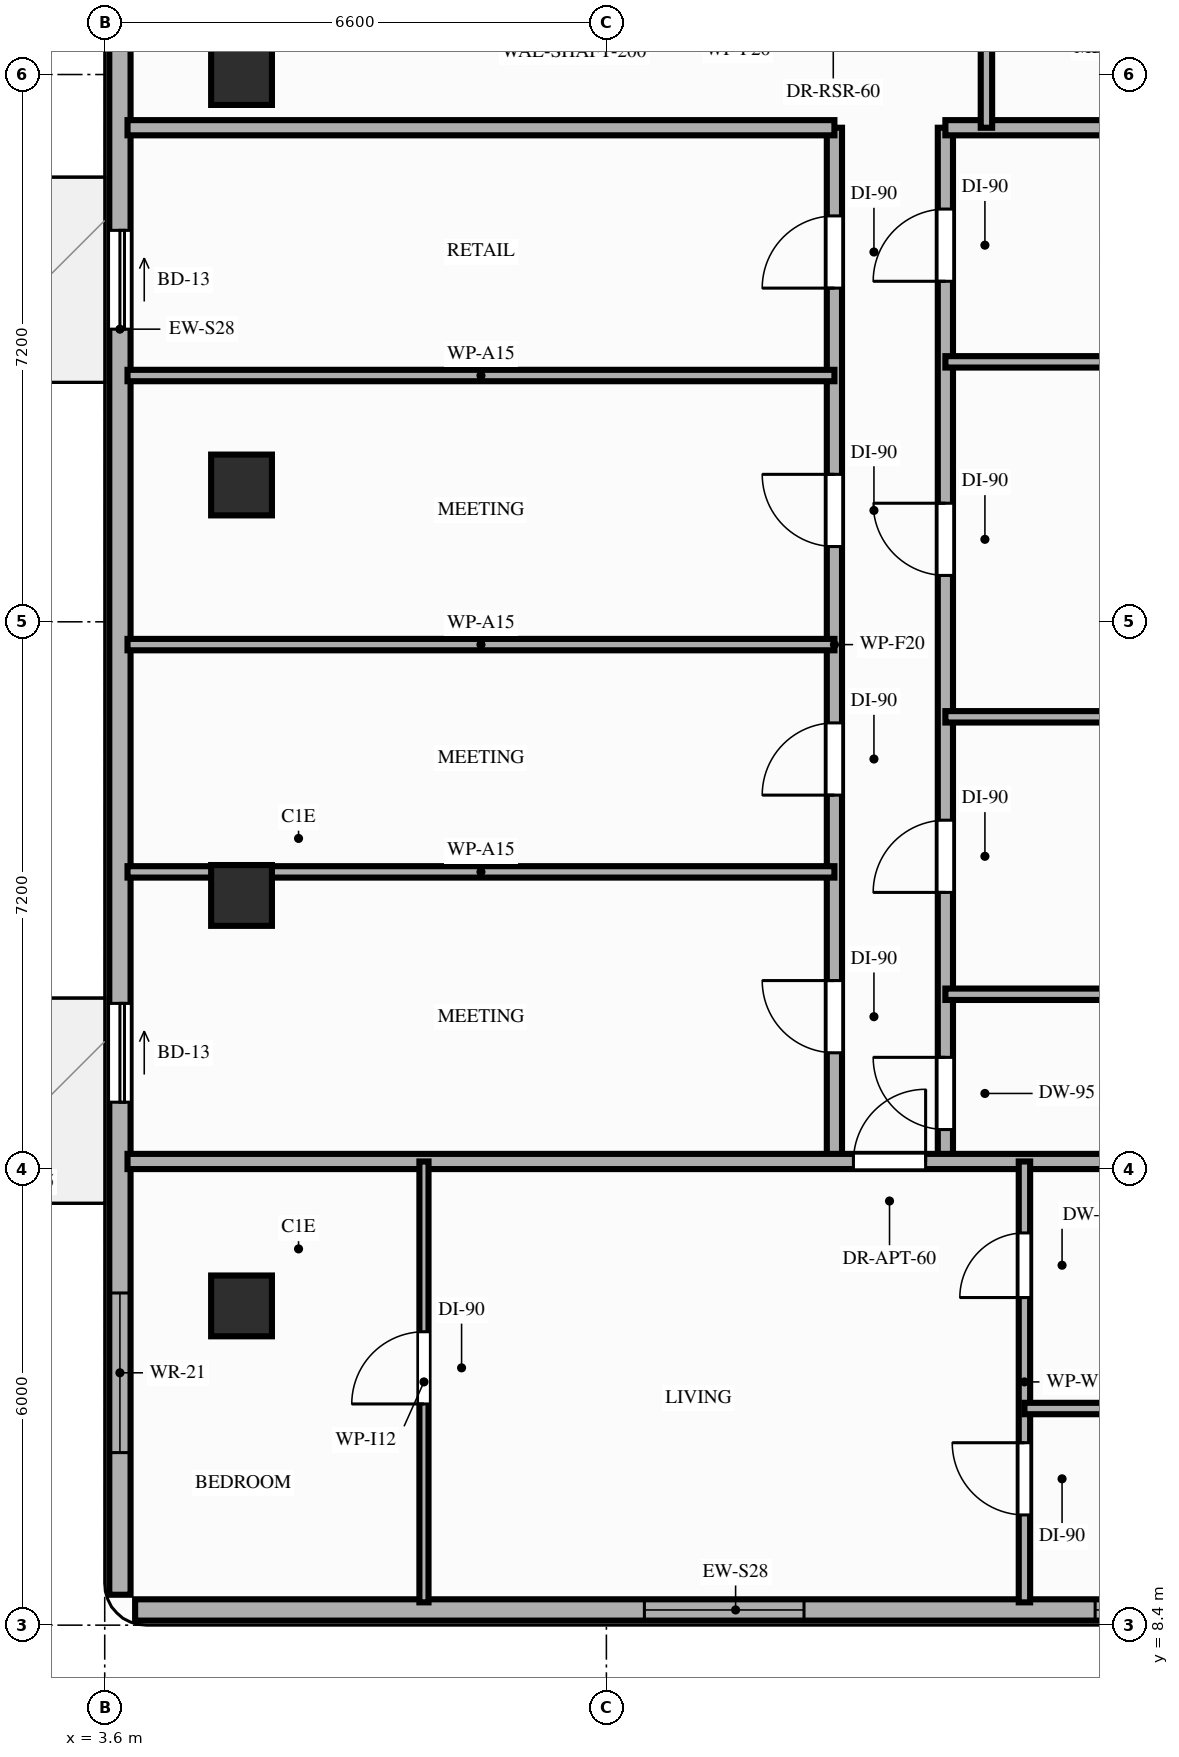
"""IFC4 building model, lengths in metres.
Left out: names, types, materials, properties, quantities, classifications, styles, units other than length and angle.
Written with IfcOpenShell. Run it as: python <this file> out.ifc"""

import sys

from ifc_helpers import new_model, si_unit, direction, frame, frame_2d, origin, origin_2d, place, context, subcontext, project, spatial, rectangle, extrude, element, fill, save


model = new_model("IFC4")
c1 = context("Model", 3, precision=1e-05, world=origin(), true_north=direction((0.0, 1.0)))
c2 = subcontext(c1, "Body", "Model", "MODEL_VIEW")
j1 = project(units=[si_unit("LENGTHUNIT", "METRE"), si_unit("PLANEANGLEUNIT", "RADIAN")], contexts=[c1])
p1 = place(None, origin())
s1 = spatial("IfcSite", under=j1, at=p1, CompositionType="ELEMENT")
p2 = place(p1, origin())
s2 = spatial("IfcBuilding", under=s1, at=p2, CompositionType="ELEMENT")
p3 = place(p2, frame((0.0, 0.0, 228.0)))
s3 = spatial("IfcBuildingStorey", under=s2, at=p3, CompositionType="ELEMENT", Elevation=228.0)
for number, where, z_axis, x_axis in (
    (1, (5.4, 12.6, 0.0), (0.0, 0.0, 1.0), (1.0, 0.0, 0.0)),
    (2, (5.4, 18.0, 0.0), (0.0, 0.0, 1.0), (1.0, 0.0, 0.0)),
    (3, (5.4, 23.4, 0.0), (0.0, 0.0, 1.0), (1.0, 0.0, 0.0)),
    (4, (5.4, 28.8, 0.0), (0.0, 0.0, 1.0), (1.0, 0.0, 0.0)),
):
    element("IfcColumn", number, at=place(p3, frame(where, z_axis=z_axis, x_axis=x_axis)), inside=s3, PredefinedType="COLUMN", context=c2, shape_type="SweptSolid", body=[
        extrude(rectangle(XDim=0.8, YDim=0.8, at=origin_2d()), origin(), (0.0, 0.0, 1.0), 3.2),
    ])
p4 = place(p3, frame((4.0, 8.6, 0.0), z_axis=(0.0, 0.0, 1.0), x_axis=(1.0, 0.0, 0.0)))
e5 = element("IfcWall", 5, at=p4, inside=s3, PredefinedType="STANDARD", context=c2, shape_type="SweptSolid", body=[
    extrude(rectangle(XDim=15.8, YDim=0.28, at=frame_2d((7.9, 0.0))), origin(), (0.0, 0.0, 1.0), 3.02),
])
p5 = place(p4, frame((6.7, 0.0, 0.85)))
e6 = element("IfcOpeningElement", 6, at=p5, cuts=e5, PredefinedType="OPENING", context=c2, shape_type="SweptSolid", body=[
    extrude(rectangle(XDim=2.1, YDim=1.8, at=frame_2d((1.05, 0.9))), frame((0.0, 0.15, 0.0), z_axis=(0.0, -1.0, 0.0), x_axis=(1.0, 0.0, 0.0)), (0.0, 0.0, 1.0), 0.3),
])
p6 = place(p4, frame((12.63, 0.0, 0.85)))
e7 = element("IfcOpeningElement", 7, at=p6, cuts=e5, PredefinedType="OPENING", context=c2, shape_type="SweptSolid", body=[
    extrude(rectangle(XDim=2.1, YDim=1.8, at=frame_2d((1.05, 0.9))), frame((0.0, 0.15, 0.0), z_axis=(0.0, -1.0, 0.0), x_axis=(1.0, 0.0, 0.0)), (0.0, 0.0, 1.0), 0.3),
])
p7 = place(p3, frame((3.8, 42.1, 0.0), z_axis=(0.0, 0.0, 1.0), x_axis=(0.0, -1.0, 0.0)))
e8 = element("IfcWall", 8, at=p7, inside=s3, PredefinedType="STANDARD", context=c2, shape_type="SweptSolid", body=[
    extrude(rectangle(XDim=33.3, YDim=0.28, at=frame_2d((16.65, 0.0))), origin(), (0.0, 0.0, 1.0), 2.71),
])
p8 = place(p7, frame((25.52, 0.0, 0.0)))
e9 = element("IfcOpeningElement", 9, at=p8, cuts=e8, PredefinedType="OPENING", context=c2, shape_type="SweptSolid", body=[
    extrude(rectangle(XDim=1.3, YDim=2.08, at=frame_2d((0.65, 1.04))), frame((0.0, 0.15, 0.0), z_axis=(0.0, -1.0, 0.0), x_axis=(1.0, 0.0, 0.0)), (0.0, 0.0, 1.0), 0.3),
])
p9 = place(p7, frame((15.35, 0.0, 0.0)))
e10 = element("IfcOpeningElement", 10, at=p9, cuts=e8, PredefinedType="OPENING", context=c2, shape_type="SweptSolid", body=[
    extrude(rectangle(XDim=1.3, YDim=2.08, at=frame_2d((0.65, 1.04))), frame((0.0, 0.15, 0.0), z_axis=(0.0, -1.0, 0.0), x_axis=(1.0, 0.0, 0.0)), (0.0, 0.0, 1.0), 0.3),
])
p10 = place(p7, frame((29.33, 0.0, 0.85)))
e11 = element("IfcOpeningElement", 11, at=p10, cuts=e8, PredefinedType="OPENING", context=c2, shape_type="SweptSolid", body=[
    extrude(rectangle(XDim=2.1, YDim=1.61, at=frame_2d((1.05, 0.805))), frame((0.0, 0.15, 0.0), z_axis=(0.0, -1.0, 0.0), x_axis=(1.0, 0.0, 0.0)), (0.0, 0.0, 1.0), 0.3),
])
p11 = place(p7, frame((9.75, 0.0, 0.85)))
e12 = element("IfcOpeningElement", 12, at=p11, cuts=e8, PredefinedType="OPENING", context=c2, shape_type="SweptSolid", body=[
    extrude(rectangle(XDim=2.1, YDim=1.61, at=frame_2d((1.05, 0.805))), frame((0.0, 0.15, 0.0), z_axis=(0.0, -1.0, 0.0), x_axis=(1.0, 0.0, 0.0)), (0.0, 0.0, 1.0), 0.3),
])
p12 = place(p7, frame((3.65, 0.0, 0.85)))
e13 = element("IfcOpeningElement", 13, at=p12, cuts=e8, PredefinedType="OPENING", context=c2, shape_type="SweptSolid", body=[
    extrude(rectangle(XDim=2.1, YDim=1.61, at=frame_2d((1.05, 0.805))), frame((0.0, 0.15, 0.0), z_axis=(0.0, -1.0, 0.0), x_axis=(1.0, 0.0, 0.0)), (0.0, 0.0, 1.0), 0.3),
])
p13 = place(p3, frame((13.2, 14.5, 0.0), z_axis=(0.0, 0.0, 1.0), x_axis=(0.0, 1.0, 0.0)))
e14 = element("IfcWall", 14, at=p13, inside=s3, PredefinedType="PARTITIONING", context=c2, shape_type="SweptSolid", body=[
    extrude(rectangle(XDim=13.6, YDim=0.2, at=frame_2d((6.8, 0.0))), origin(), (0.0, 0.0, 1.0), 2.51),
])
p14 = place(p13, frame((1.43, 0.0, 0.0)))
e15 = element("IfcOpeningElement", 15, at=p14, cuts=e14, PredefinedType="OPENING", context=c2, shape_type="SweptSolid", body=[
    extrude(rectangle(XDim=0.95, YDim=2.15, at=frame_2d((0.475, 1.075))), frame((0.0, 0.11, 0.0), z_axis=(0.0, -1.0, 0.0), x_axis=(1.0, 0.0, 0.0)), (0.0, 0.0, 1.0), 0.22),
])
p15 = place(p13, frame((4.82, 0.0, 0.0)))
e16 = element("IfcOpeningElement", 16, at=p15, cuts=e14, PredefinedType="OPENING", context=c2, shape_type="SweptSolid", body=[
    extrude(rectangle(XDim=0.95, YDim=2.15, at=frame_2d((0.475, 1.075))), frame((0.0, 0.11, 0.0), z_axis=(0.0, -1.0, 0.0), x_axis=(1.0, 0.0, 0.0)), (0.0, 0.0, 1.0), 0.22),
])
p16 = place(p13, frame((8.09, 0.0, 0.0)))
e17 = element("IfcOpeningElement", 17, at=p16, cuts=e14, PredefinedType="OPENING", context=c2, shape_type="SweptSolid", body=[
    extrude(rectangle(XDim=0.95, YDim=2.15, at=frame_2d((0.475, 1.075))), frame((0.0, 0.11, 0.0), z_axis=(0.0, -1.0, 0.0), x_axis=(1.0, 0.0, 0.0)), (0.0, 0.0, 1.0), 0.22),
])
p17 = place(p13, frame((11.49, 0.0, 0.0)))
e18 = element("IfcOpeningElement", 18, at=p17, cuts=e14, PredefinedType="OPENING", context=c2, shape_type="SweptSolid", body=[
    extrude(rectangle(XDim=0.95, YDim=2.15, at=frame_2d((0.475, 1.075))), frame((0.0, 0.11, 0.0), z_axis=(0.0, -1.0, 0.0), x_axis=(1.0, 0.0, 0.0)), (0.0, 0.0, 1.0), 0.22),
])
p18 = place(p3, frame((14.66, 14.5, 0.0), z_axis=(0.0, 0.0, 1.0), x_axis=(0.0, 1.0, 0.0)))
e19 = element("IfcWall", 19, at=p18, inside=s3, PredefinedType="PARTITIONING", context=c2, shape_type="SweptSolid", body=[
    extrude(rectangle(XDim=13.6, YDim=0.2, at=frame_2d((6.8, 0.0))), origin(), (0.0, 0.0, 1.0), 2.51),
])
p19 = place(p18, frame((0.42, 0.0, 0.0)))
e20 = element("IfcOpeningElement", 20, at=p19, cuts=e19, PredefinedType="OPENING", context=c2, shape_type="SweptSolid", body=[
    extrude(rectangle(XDim=0.95, YDim=2.1, at=frame_2d((0.475, 1.05))), frame((0.0, 0.11, 0.0), z_axis=(0.0, -1.0, 0.0), x_axis=(1.0, 0.0, 0.0)), (0.0, 0.0, 1.0), 0.22),
])
p20 = place(p18, frame((3.54, 0.0, 0.0)))
e21 = element("IfcOpeningElement", 21, at=p20, cuts=e19, PredefinedType="OPENING", context=c2, shape_type="SweptSolid", body=[
    extrude(rectangle(XDim=0.95, YDim=2.15, at=frame_2d((0.475, 1.075))), frame((0.0, 0.11, 0.0), z_axis=(0.0, -1.0, 0.0), x_axis=(1.0, 0.0, 0.0)), (0.0, 0.0, 1.0), 0.22),
])
p21 = place(p18, frame((7.71, 0.0, 0.0)))
e22 = element("IfcOpeningElement", 22, at=p21, cuts=e19, PredefinedType="OPENING", context=c2, shape_type="SweptSolid", body=[
    extrude(rectangle(XDim=0.95, YDim=2.15, at=frame_2d((0.475, 1.075))), frame((0.0, 0.11, 0.0), z_axis=(0.0, -1.0, 0.0), x_axis=(1.0, 0.0, 0.0)), (0.0, 0.0, 1.0), 0.22),
])
p22 = place(p18, frame((11.58, 0.0, 0.0)))
e23 = element("IfcOpeningElement", 23, at=p22, cuts=e19, PredefinedType="OPENING", context=c2, shape_type="SweptSolid", body=[
    extrude(rectangle(XDim=0.95, YDim=2.15, at=frame_2d((0.475, 1.075))), frame((0.0, 0.11, 0.0), z_axis=(0.0, -1.0, 0.0), x_axis=(1.0, 0.0, 0.0)), (0.0, 0.0, 1.0), 0.22),
])
p23 = place(p3, frame((3.9, 14.5, 0.0), z_axis=(0.0, 0.0, 1.0), x_axis=(1.0, 0.0, 0.0)))
e24 = element("IfcWall", 24, at=p23, inside=s3, PredefinedType="PARTITIONING", context=c2, shape_type="SweptSolid", body=[
    extrude(rectangle(XDim=16.0, YDim=0.2, at=frame_2d((8.0, 0.0))), origin(), (0.0, 0.0, 1.0), 2.51),
])
p24 = place(p23, frame((9.55, 0.0, 0.0)))
e25 = element("IfcOpeningElement", 25, at=p24, cuts=e24, PredefinedType="OPENING", context=c2, shape_type="SweptSolid", body=[
    extrude(rectangle(XDim=0.95, YDim=2.15, at=frame_2d((0.475, 1.075))), frame((0.0, 0.11, 0.0), z_axis=(0.0, -1.0, 0.0), x_axis=(1.0, 0.0, 0.0)), (0.0, 0.0, 1.0), 0.22),
])
p25 = place(p3, frame((3.9, 28.1, 0.0), z_axis=(0.0, 0.0, 1.0), x_axis=(1.0, 0.0, 0.0)))
e26 = element("IfcWall", 26, at=p25, inside=s3, PredefinedType="PARTITIONING", context=c2, shape_type="SweptSolid", body=[
    extrude(rectangle(XDim=9.3, YDim=0.2, at=frame_2d((4.65, 0.0))), origin(), (0.0, 0.0, 1.0), 2.51),
])
p26 = place(p3, frame((14.66, 28.1, 0.0), z_axis=(0.0, 0.0, 1.0), x_axis=(1.0, 0.0, 0.0)))
e27 = element("IfcWall", 27, at=p26, inside=s3, PredefinedType="PARTITIONING", context=c2, shape_type="SweptSolid", body=[
    extrude(rectangle(XDim=5.24, YDim=0.2, at=frame_2d((2.62, 0.0))), origin(), (0.0, 0.0, 1.0), 2.51),
])
p27 = place(p3, frame((15.2, 28.1, 0.0), z_axis=(0.0, 0.0, 1.0), x_axis=(0.0, 1.0, 0.0)))
e28 = element("IfcWall", 28, at=p27, inside=s3, PredefinedType="PARTITIONING", context=c2, shape_type="SweptSolid", body=[
    extrude(rectangle(XDim=3.05, YDim=0.15, at=frame_2d((1.525, 0.0))), origin(), (0.0, 0.0, 1.0), 2.51),
])
p28 = place(p3, frame((7.8, 8.7, 0.0), z_axis=(0.0, 0.0, 1.0), x_axis=(0.0, 1.0, 0.0)))
e29 = element("IfcWall", 29, at=p28, inside=s3, PredefinedType="PARTITIONING", context=c2, shape_type="SweptSolid", body=[
    extrude(rectangle(XDim=5.8, YDim=0.12, at=frame_2d((2.9, 0.0))), origin(), (0.0, 0.0, 1.0), 2.51),
])
p29 = place(p28, frame((2.61, 0.0, 0.0)))
e30 = element("IfcOpeningElement", 30, at=p29, cuts=e29, PredefinedType="OPENING", context=c2, shape_type="SweptSolid", body=[
    extrude(rectangle(XDim=0.95, YDim=2.15, at=frame_2d((0.475, 1.075))), frame((0.0, 0.07, 0.0), z_axis=(0.0, -1.0, 0.0), x_axis=(1.0, 0.0, 0.0)), (0.0, 0.0, 1.0), 0.14),
])
p30 = place(p3, frame((15.7, 8.7, 0.0), z_axis=(0.0, 0.0, 1.0), x_axis=(0.0, 1.0, 0.0)))
e31 = element("IfcWall", 31, at=p30, inside=s3, PredefinedType="PARTITIONING", context=c2, shape_type="SweptSolid", body=[
    extrude(rectangle(XDim=5.8, YDim=0.15, at=frame_2d((2.9, 0.0))), origin(), (0.0, 0.0, 1.0), 2.51),
])
p31 = place(p30, frame((1.15, 0.0, 0.0)))
e32 = element("IfcOpeningElement", 32, at=p31, cuts=e31, PredefinedType="OPENING", context=c2, shape_type="SweptSolid", body=[
    extrude(rectangle(XDim=0.95, YDim=2.15, at=frame_2d((0.475, 1.075))), frame((0.0, 0.085, 0.0), z_axis=(0.0, -1.0, 0.0), x_axis=(1.0, 0.0, 0.0)), (0.0, 0.0, 1.0), 0.17),
])
p32 = place(p30, frame((4.01, 0.0, 0.0)))
e33 = element("IfcOpeningElement", 33, at=p32, cuts=e31, PredefinedType="OPENING", context=c2, shape_type="SweptSolid", body=[
    extrude(rectangle(XDim=0.85, YDim=2.1, at=frame_2d((0.425, 1.05))), frame((0.0, 0.085, 0.0), z_axis=(0.0, -1.0, 0.0), x_axis=(1.0, 0.0, 0.0)), (0.0, 0.0, 1.0), 0.17),
])
p33 = place(p3, frame((15.7, 11.25, 0.0), z_axis=(0.0, 0.0, 1.0), x_axis=(1.0, 0.0, 0.0)))
e34 = element("IfcWall", 34, at=p33, inside=s3, PredefinedType="PARTITIONING", context=c2, shape_type="SweptSolid", body=[
    extrude(rectangle(XDim=4.2, YDim=0.15, at=frame_2d((2.1, 0.0))), origin(), (0.0, 0.0, 1.0), 3.02),
])
for number, where, z_axis, x_axis in (
    (35, (3.9, 18.31, 0.0), (0.0, 0.0, 1.0), (1.0, 0.0, 0.0)),
    (36, (3.9, 21.3, 0.0), (0.0, 0.0, 1.0), (1.0, 0.0, 0.0)),
    (37, (3.9, 24.84, 0.0), (0.0, 0.0, 1.0), (1.0, 0.0, 0.0)),
):
    element("IfcWall", number, at=place(p3, frame(where, z_axis=z_axis, x_axis=x_axis)), inside=s3, PredefinedType="PARTITIONING", context=c2, shape_type="SweptSolid", body=[
        extrude(rectangle(XDim=9.3, YDim=0.15, at=frame_2d((4.65, 0.0))), origin(), (0.0, 0.0, 1.0), 2.51),
    ])
for number, where, z_axis, x_axis in (
    (38, (14.66, 16.7, 0.0), (0.0, 0.0, 1.0), (1.0, 0.0, 0.0)),
    (39, (14.66, 20.35, 0.0), (0.0, 0.0, 1.0), (1.0, 0.0, 0.0)),
    (40, (14.66, 25.02, 0.0), (0.0, 0.0, 1.0), (1.0, 0.0, 0.0)),
):
    element("IfcWall", number, at=place(p3, frame(where, z_axis=z_axis, x_axis=x_axis)), inside=s3, PredefinedType="PARTITIONING", context=c2, shape_type="SweptSolid", body=[
        extrude(rectangle(XDim=5.24, YDim=0.15, at=frame_2d((2.62, 0.0))), origin(), (0.0, 0.0, 1.0), 2.51),
    ])
p34 = place(p8, origin())
e41 = element("IfcDoor", 41, at=p34, inside=s3, OperationType="SLIDING_TO_LEFT", PredefinedType="DOOR", context=c2, shape_type="SweptSolid", body=[
    extrude(rectangle(XDim=1.3, YDim=2.08, at=frame_2d((0.65, 1.04))), frame((0.0, 0.025, 0.0), z_axis=(0.0, -1.0, 0.0), x_axis=(1.0, 0.0, 0.0)), (0.0, 0.0, 1.0), 0.05),
])
fill(e9, e41)
p35 = place(p9, origin())
e42 = element("IfcDoor", 42, at=p35, inside=s3, OperationType="SLIDING_TO_LEFT", PredefinedType="DOOR", context=c2, shape_type="SweptSolid", body=[
    extrude(rectangle(XDim=1.3, YDim=2.08, at=frame_2d((0.65, 1.04))), frame((0.0, 0.025, 0.0), z_axis=(0.0, -1.0, 0.0), x_axis=(1.0, 0.0, 0.0)), (0.0, 0.0, 1.0), 0.05),
])
fill(e10, e42)
p36 = place(p10, origin())
e43 = element("IfcWindow", 43, at=p36, inside=s3, PartitioningType="SINGLE_PANEL", PredefinedType="WINDOW", context=c2, shape_type="SweptSolid", body=[
    extrude(rectangle(XDim=2.1, YDim=1.61, at=frame_2d((1.05, 0.805))), frame((0.0, 0.03, 0.0), z_axis=(0.0, -1.0, 0.0), x_axis=(1.0, 0.0, 0.0)), (0.0, 0.0, 1.0), 0.06),
])
fill(e11, e43)
p37 = place(p5, origin())
e44 = element("IfcWindow", 44, at=p37, inside=s3, PartitioningType="SINGLE_PANEL", PredefinedType="WINDOW", context=c2, shape_type="SweptSolid", body=[
    extrude(rectangle(XDim=2.1, YDim=1.8, at=frame_2d((1.05, 0.9))), frame((0.0, 0.03, 0.0), z_axis=(0.0, -1.0, 0.0), x_axis=(1.0, 0.0, 0.0)), (0.0, 0.0, 1.0), 0.06),
])
fill(e6, e44)
p38 = place(p6, origin())
e45 = element("IfcWindow", 45, at=p38, inside=s3, PartitioningType="SINGLE_PANEL", PredefinedType="WINDOW", context=c2, shape_type="SweptSolid", body=[
    extrude(rectangle(XDim=2.1, YDim=1.8, at=frame_2d((1.05, 0.9))), frame((0.0, 0.03, 0.0), z_axis=(0.0, -1.0, 0.0), x_axis=(1.0, 0.0, 0.0)), (0.0, 0.0, 1.0), 0.06),
])
fill(e7, e45)
p39 = place(p24, origin())
e46 = element("IfcDoor", 46, at=p39, inside=s3, OperationType="SINGLE_SWING_RIGHT", PredefinedType="DOOR", context=c2, shape_type="SweptSolid", body=[
    extrude(rectangle(XDim=0.95, YDim=2.15, at=frame_2d((0.475, 1.075))), frame((0.0, 0.025, 0.0), z_axis=(0.0, -1.0, 0.0), x_axis=(1.0, 0.0, 0.0)), (0.0, 0.0, 1.0), 0.05),
])
fill(e25, e46)
p40 = place(p29, origin())
e47 = element("IfcDoor", 47, at=p40, inside=s3, OperationType="SINGLE_SWING_LEFT", PredefinedType="DOOR", context=c2, shape_type="SweptSolid", body=[
    extrude(rectangle(XDim=0.95, YDim=2.15, at=frame_2d((0.475, 1.075))), frame((0.0, 0.025, 0.0), z_axis=(0.0, -1.0, 0.0), x_axis=(1.0, 0.0, 0.0)), (0.0, 0.0, 1.0), 0.05),
])
fill(e30, e47)
p41 = place(p31, origin())
e48 = element("IfcDoor", 48, at=p41, inside=s3, OperationType="SINGLE_SWING_RIGHT", PredefinedType="DOOR", context=c2, shape_type="SweptSolid", body=[
    extrude(rectangle(XDim=0.95, YDim=2.15, at=frame_2d((0.475, 1.075))), frame((0.0, 0.025, 0.0), z_axis=(0.0, -1.0, 0.0), x_axis=(1.0, 0.0, 0.0)), (0.0, 0.0, 1.0), 0.05),
])
fill(e32, e48)
p42 = place(p32, origin())
e49 = element("IfcDoor", 49, at=p42, inside=s3, OperationType="SINGLE_SWING_LEFT", PredefinedType="DOOR", context=c2, shape_type="SweptSolid", body=[
    extrude(rectangle(XDim=0.85, YDim=2.1, at=frame_2d((0.425, 1.05))), frame((0.0, 0.025, 0.0), z_axis=(0.0, -1.0, 0.0), x_axis=(1.0, 0.0, 0.0)), (0.0, 0.0, 1.0), 0.05),
])
fill(e33, e49)
p43 = place(p14, origin())
e50 = element("IfcDoor", 50, at=p43, inside=s3, OperationType="SINGLE_SWING_RIGHT", PredefinedType="DOOR", context=c2, shape_type="SweptSolid", body=[
    extrude(rectangle(XDim=0.95, YDim=2.15, at=frame_2d((0.475, 1.075))), frame((0.0, 0.025, 0.0), z_axis=(0.0, -1.0, 0.0), x_axis=(1.0, 0.0, 0.0)), (0.0, 0.0, 1.0), 0.05),
])
fill(e15, e50)
p44 = place(p15, origin())
e51 = element("IfcDoor", 51, at=p44, inside=s3, OperationType="SINGLE_SWING_LEFT", PredefinedType="DOOR", context=c2, shape_type="SweptSolid", body=[
    extrude(rectangle(XDim=0.95, YDim=2.15, at=frame_2d((0.475, 1.075))), frame((0.0, 0.025, 0.0), z_axis=(0.0, -1.0, 0.0), x_axis=(1.0, 0.0, 0.0)), (0.0, 0.0, 1.0), 0.05),
])
fill(e16, e51)
p45 = place(p16, origin())
e52 = element("IfcDoor", 52, at=p45, inside=s3, OperationType="SINGLE_SWING_RIGHT", PredefinedType="DOOR", context=c2, shape_type="SweptSolid", body=[
    extrude(rectangle(XDim=0.95, YDim=2.15, at=frame_2d((0.475, 1.075))), frame((0.0, 0.025, 0.0), z_axis=(0.0, -1.0, 0.0), x_axis=(1.0, 0.0, 0.0)), (0.0, 0.0, 1.0), 0.05),
])
fill(e17, e52)
p46 = place(p17, origin())
e53 = element("IfcDoor", 53, at=p46, inside=s3, OperationType="SINGLE_SWING_LEFT", PredefinedType="DOOR", context=c2, shape_type="SweptSolid", body=[
    extrude(rectangle(XDim=0.95, YDim=2.15, at=frame_2d((0.475, 1.075))), frame((0.0, 0.025, 0.0), z_axis=(0.0, -1.0, 0.0), x_axis=(1.0, 0.0, 0.0)), (0.0, 0.0, 1.0), 0.05),
])
fill(e18, e53)
p47 = place(p19, origin())
e54 = element("IfcDoor", 54, at=p47, inside=s3, OperationType="SINGLE_SWING_RIGHT", PredefinedType="DOOR", context=c2, shape_type="SweptSolid", body=[
    extrude(rectangle(XDim=0.95, YDim=2.1, at=frame_2d((0.475, 1.05))), frame((0.0, 0.025, 0.0), z_axis=(0.0, -1.0, 0.0), x_axis=(1.0, 0.0, 0.0)), (0.0, 0.0, 1.0), 0.05),
])
fill(e20, e54)
p48 = place(p20, origin())
e55 = element("IfcDoor", 55, at=p48, inside=s3, OperationType="SINGLE_SWING_LEFT", PredefinedType="DOOR", context=c2, shape_type="SweptSolid", body=[
    extrude(rectangle(XDim=0.95, YDim=2.15, at=frame_2d((0.475, 1.075))), frame((0.0, 0.025, 0.0), z_axis=(0.0, -1.0, 0.0), x_axis=(1.0, 0.0, 0.0)), (0.0, 0.0, 1.0), 0.05),
])
fill(e21, e55)
p49 = place(p21, origin())
e56 = element("IfcDoor", 56, at=p49, inside=s3, OperationType="SINGLE_SWING_RIGHT", PredefinedType="DOOR", context=c2, shape_type="SweptSolid", body=[
    extrude(rectangle(XDim=0.95, YDim=2.15, at=frame_2d((0.475, 1.075))), frame((0.0, 0.025, 0.0), z_axis=(0.0, -1.0, 0.0), x_axis=(1.0, 0.0, 0.0)), (0.0, 0.0, 1.0), 0.05),
])
fill(e22, e56)
p50 = place(p22, origin())
e57 = element("IfcDoor", 57, at=p50, inside=s3, OperationType="SINGLE_SWING_LEFT", PredefinedType="DOOR", context=c2, shape_type="SweptSolid", body=[
    extrude(rectangle(XDim=0.95, YDim=2.15, at=frame_2d((0.475, 1.075))), frame((0.0, 0.025, 0.0), z_axis=(0.0, -1.0, 0.0), x_axis=(1.0, 0.0, 0.0)), (0.0, 0.0, 1.0), 0.05),
])
fill(e23, e57)
save(model, sys.argv[1])
